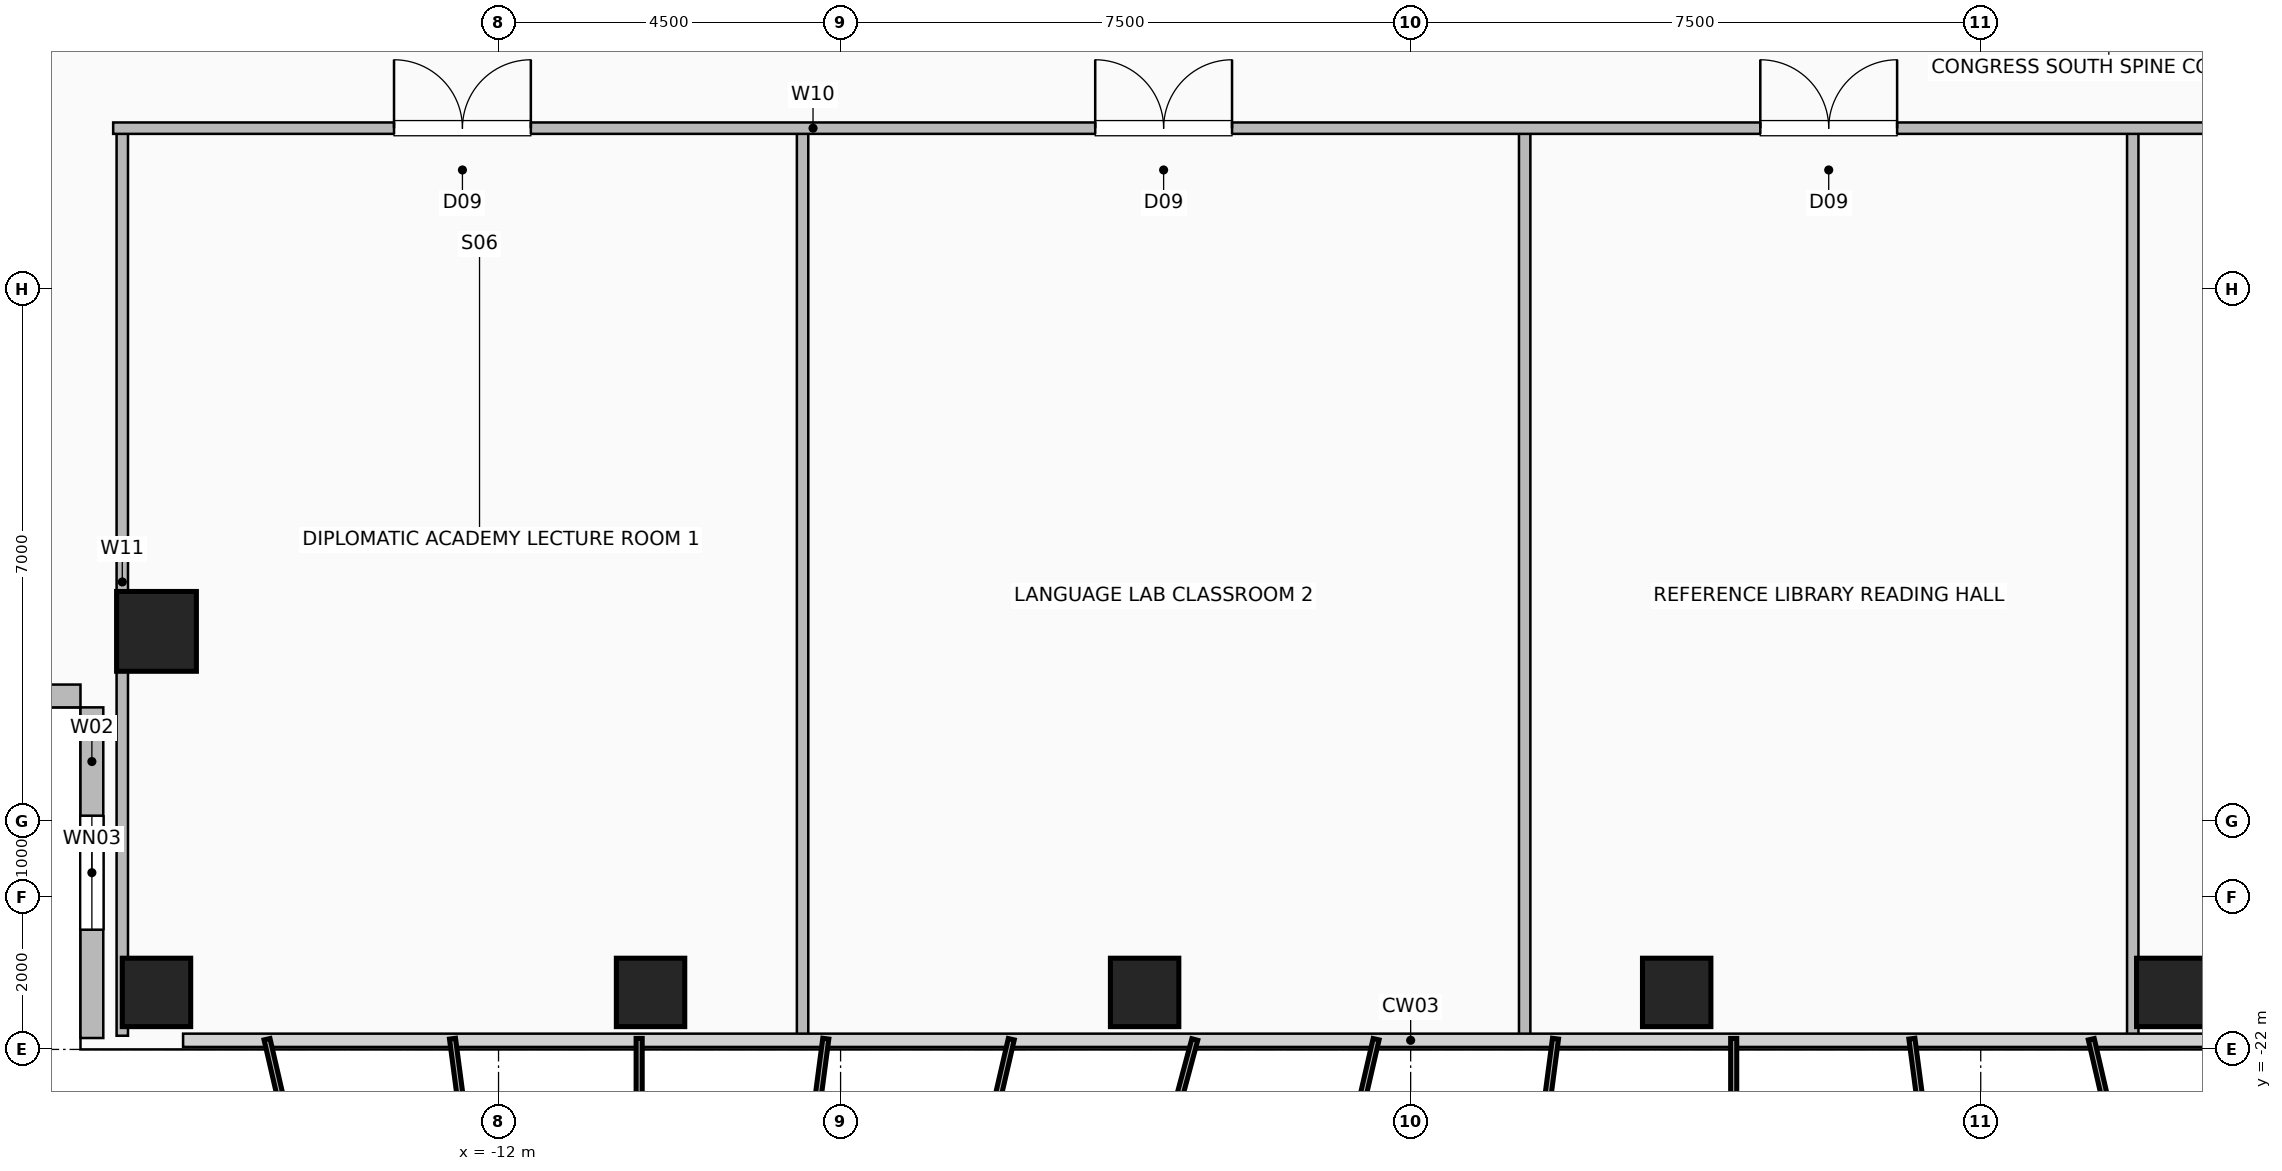
"""IFC4 building model, lengths in metres.
Left out: names, types, materials, properties, quantities, classifications, styles, units other than length and angle.
Written with IfcOpenShell. Run it as: python <this file> out.ifc"""

import sys

from ifc_helpers import new_model, si_unit, direction, frame, frame_2d, origin, origin_2d, place, context, subcontext, project, spatial, rectangle, hollow_rectangle, extrude, element, fill, save


model = new_model("IFC4")
c1 = context("Model", 3, precision=1e-05, world=origin(), true_north=direction((0.0, 1.0)))
c2 = subcontext(c1, "Body", "Model", "MODEL_VIEW")
j1 = project(units=[si_unit("LENGTHUNIT", "METRE"), si_unit("PLANEANGLEUNIT", "RADIAN")], contexts=[c1])
p1 = place(None, origin())
s1 = spatial("IfcSite", under=j1, at=p1, CompositionType="ELEMENT")
p2 = place(p1, origin())
s2 = spatial("IfcBuilding", under=s1, at=p2, CompositionType="ELEMENT")
p3 = place(p2, frame((0.0, 0.0, 137.2)))
s3 = spatial("IfcBuildingStorey", under=s2, at=p3, CompositionType="ELEMENT", Elevation=137.2)
for number, where, z_axis, x_axis in (
    (1, (-16.5, -21.25, 0.0), (0.0, 0.0, 1.0), (1.0, 0.0, 0.0)),
    (2, (-10.0, -21.25, 0.0), (0.0, 0.0, 1.0), (1.0, 0.0, 0.0)),
    (3, (-3.5, -21.25, 0.0), (0.0, 0.0, 1.0), (1.0, 0.0, 0.0)),
    (4, (3.5, -21.25, 0.0), (0.0, 0.0, 1.0), (1.0, 0.0, 0.0)),
    (5, (10.0, -21.25, 0.0), (0.0, 0.0, 1.0), (1.0, 0.0, 0.0)),
):
    element("IfcColumn", number, at=place(p3, frame(where, z_axis=z_axis, x_axis=x_axis)), inside=s3, PredefinedType="COLUMN", context=c2, shape_type="SweptSolid", body=[
        extrude(hollow_rectangle(XDim=0.9, YDim=0.9, WallThickness=0.045, at=origin_2d()), origin(), (0.0, 0.0, 1.0), 3.6),
    ])
p4 = place(p3, frame((-16.5, -16.5, 0.0), z_axis=(0.0, 0.0, 1.0), x_axis=(1.0, 0.0, 0.0)))
e6 = element("IfcColumn", 6, at=p4, inside=s3, PredefinedType="COLUMN", context=c2, shape_type="SweptSolid", body=[
    extrude(hollow_rectangle(XDim=1.05, YDim=1.05, WallThickness=0.05, at=origin_2d()), origin(), (0.0, 0.0, 1.0), 3.6),
])
p5 = place(p3, frame((-17.35, -21.85, 0.0), z_axis=(0.0, 0.0, 1.0), x_axis=(0.0, 1.0, 0.0)))
e7 = element("IfcWall", 7, at=p5, inside=s3, PredefinedType="SOLIDWALL", context=c2, shape_type="SweptSolid", body=[
    extrude(rectangle(XDim=4.35, YDim=0.3, at=frame_2d((2.175, 0.0))), origin(), (0.0, 0.0, 1.0), 3.36),
])
p6 = place(p5, frame((1.425, 0.0, 0.9)))
e8 = element("IfcOpeningElement", 8, at=p6, cuts=e7, PredefinedType="OPENING", context=c2, shape_type="SweptSolid", body=[
    extrude(rectangle(XDim=1.5, YDim=1.8, at=frame_2d((0.75, 0.9))), frame((0.0, 0.16, 0.0), z_axis=(0.0, -1.0, 0.0), x_axis=(1.0, 0.0, 0.0)), (0.0, 0.0, 1.0), 0.32),
])
p7 = place(p3, frame((-21.85, -17.35, 0.0), z_axis=(0.0, 0.0, 1.0), x_axis=(1.0, 0.0, 0.0)))
e9 = element("IfcWall", 9, at=p7, inside=s3, PredefinedType="SOLIDWALL", context=c2, shape_type="SweptSolid", body=[
    extrude(rectangle(XDim=4.35, YDim=0.3, at=frame_2d((2.175, 0.0))), origin(), (0.0, 0.0, 1.0), 3.36),
])
for number, where, z_axis, x_axis in (
    (10, (-16.95, -21.82, 0.0), (0.0, 0.0, 1.0), (0.0, 1.0, 0.0)),
    (11, (-8.0, -21.82, 0.0), (0.0, 0.0, 1.0), (0.0, 1.0, 0.0)),
    (12, (1.5, -21.82, 0.0), (0.0, 0.0, 1.0), (0.0, 1.0, 0.0)),
    (13, (9.5, -21.82, 0.0), (0.0, 0.0, 1.0), (0.0, 1.0, 0.0)),
):
    element("IfcWall", number, at=place(p3, frame(where, z_axis=z_axis, x_axis=x_axis)), inside=s3, PredefinedType="PARTITIONING", context=c2, shape_type="SweptSolid", body=[
        extrude(rectangle(XDim=11.94, YDim=0.15, at=frame_2d((5.97, 0.0))), origin(), (0.0, 0.0, 1.0), 3.36),
    ])
p8 = place(p3, frame((-17.07, -9.88, 0.0), z_axis=(0.0, 0.0, 1.0), x_axis=(1.0, 0.0, 0.0)))
e14 = element("IfcWall", 14, at=p8, inside=s3, PredefinedType="PARTITIONING", context=c2, shape_type="SweptSolid", body=[
    extrude(rectangle(XDim=34.14, YDim=0.15, at=frame_2d((17.07, 0.0))), origin(), (0.0, 0.0, 1.0), 3.36),
])
p9 = place(p8, frame((3.695, 0.0, 0.0)))
e15 = element("IfcOpeningElement", 15, at=p9, cuts=e14, PredefinedType="OPENING", context=c2, shape_type="SweptSolid", body=[
    extrude(rectangle(XDim=1.8, YDim=2.08, at=frame_2d((0.9, 1.04))), frame((0.0, 0.085, 0.0), z_axis=(0.0, -1.0, 0.0), x_axis=(1.0, 0.0, 0.0)), (0.0, 0.0, 1.0), 0.17),
])
p10 = place(p8, frame((12.92, 0.0, 0.0)))
e16 = element("IfcOpeningElement", 16, at=p10, cuts=e14, PredefinedType="OPENING", context=c2, shape_type="SweptSolid", body=[
    extrude(rectangle(XDim=1.8, YDim=2.08, at=frame_2d((0.9, 1.04))), frame((0.0, 0.085, 0.0), z_axis=(0.0, -1.0, 0.0), x_axis=(1.0, 0.0, 0.0)), (0.0, 0.0, 1.0), 0.17),
])
p11 = place(p8, frame((21.67, 0.0, 0.0)))
e17 = element("IfcOpeningElement", 17, at=p11, cuts=e14, PredefinedType="OPENING", context=c2, shape_type="SweptSolid", body=[
    extrude(rectangle(XDim=1.8, YDim=2.08, at=frame_2d((0.9, 1.04))), frame((0.0, 0.085, 0.0), z_axis=(0.0, -1.0, 0.0), x_axis=(1.0, 0.0, 0.0)), (0.0, 0.0, 1.0), 0.17),
])
p12 = place(p8, frame((29.82, 0.0, 0.0)))
e18 = element("IfcOpeningElement", 18, at=p12, cuts=e14, PredefinedType="OPENING", context=c2, shape_type="SweptSolid", body=[
    extrude(rectangle(XDim=0.95, YDim=2.06, at=frame_2d((0.475, 1.03))), frame((0.0, 0.085, 0.0), z_axis=(0.0, -1.0, 0.0), x_axis=(1.0, 0.0, 0.0)), (0.0, 0.0, 1.0), 0.17),
])
p13 = place(p6, origin())
e19 = element("IfcWindow", 19, at=p13, inside=s3, PartitioningType="SINGLE_PANEL", PredefinedType="WINDOW", context=c2, shape_type="SweptSolid", body=[
    extrude(rectangle(XDim=1.5, YDim=1.8, at=frame_2d((0.75, 0.9))), frame((0.0, 0.03, 0.0), z_axis=(0.0, -1.0, 0.0), x_axis=(1.0, 0.0, 0.0)), (0.0, 0.0, 1.0), 0.06),
])
fill(e8, e19)
p14 = place(p9, origin())
e20 = element("IfcDoor", 20, at=p14, inside=s3, OperationType="DOUBLE_DOOR_SINGLE_SWING", PredefinedType="DOOR", context=c2, shape_type="SweptSolid", body=[
    extrude(rectangle(XDim=1.8, YDim=2.08, at=frame_2d((0.9, 1.04))), frame((0.0, 0.025, 0.0), z_axis=(0.0, -1.0, 0.0), x_axis=(1.0, 0.0, 0.0)), (0.0, 0.0, 1.0), 0.05),
])
fill(e15, e20)
p15 = place(p10, origin())
e21 = element("IfcDoor", 21, at=p15, inside=s3, OperationType="DOUBLE_DOOR_SINGLE_SWING", PredefinedType="DOOR", context=c2, shape_type="SweptSolid", body=[
    extrude(rectangle(XDim=1.8, YDim=2.08, at=frame_2d((0.9, 1.04))), frame((0.0, 0.025, 0.0), z_axis=(0.0, -1.0, 0.0), x_axis=(1.0, 0.0, 0.0)), (0.0, 0.0, 1.0), 0.05),
])
fill(e16, e21)
p16 = place(p11, origin())
e22 = element("IfcDoor", 22, at=p16, inside=s3, OperationType="DOUBLE_DOOR_SINGLE_SWING", PredefinedType="DOOR", context=c2, shape_type="SweptSolid", body=[
    extrude(rectangle(XDim=1.8, YDim=2.08, at=frame_2d((0.9, 1.04))), frame((0.0, 0.025, 0.0), z_axis=(0.0, -1.0, 0.0), x_axis=(1.0, 0.0, 0.0)), (0.0, 0.0, 1.0), 0.05),
])
fill(e17, e22)
save(model, sys.argv[1])
